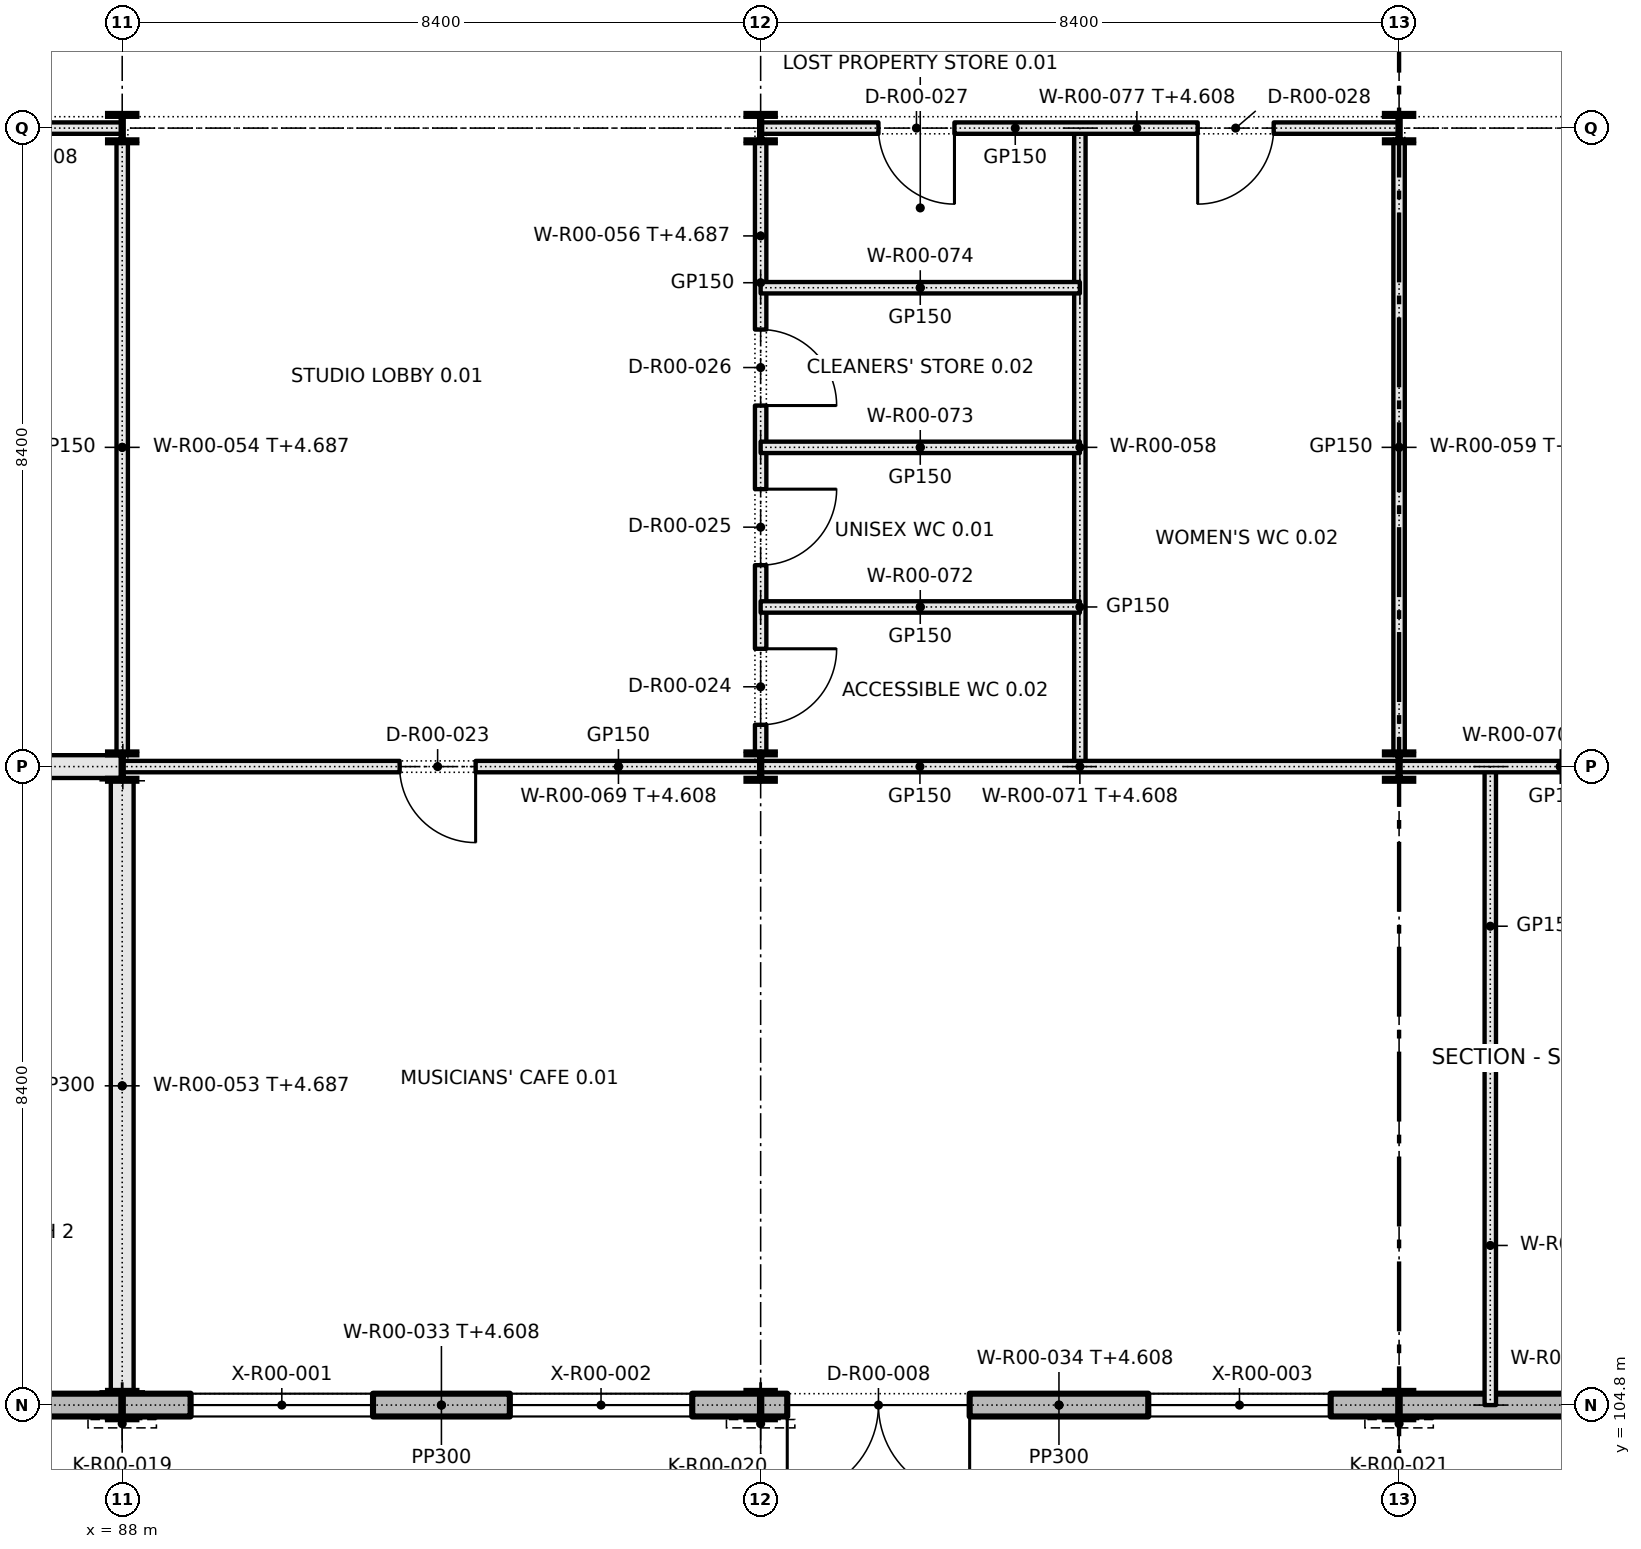
"""IFC4 building model, lengths in metres.
Left out: names, types, materials, properties, quantities, classifications, styles, units other than length and angle.
Written with IfcOpenShell. Run it as: python <this file> out.ifc"""

import sys

from ifc_helpers import new_model, si_unit, direction, frame, frame_2d, origin, origin_2d, place, context, subcontext, project, spatial, rectangle, i_section, extrude, element, fill, save


model = new_model("IFC4")
c1 = context("Model", 3, precision=1e-05, world=origin(), true_north=direction((0.0, 1.0)))
c2 = subcontext(c1, "Body", "Model", "MODEL_VIEW")
j1 = project(units=[si_unit("LENGTHUNIT", "METRE"), si_unit("PLANEANGLEUNIT", "RADIAN")], contexts=[c1])
p1 = place(None, origin())
s1 = spatial("IfcSite", under=j1, at=p1, CompositionType="ELEMENT")
p2 = place(p1, origin())
s2 = spatial("IfcBuilding", under=s1, at=p2, CompositionType="ELEMENT")
p3 = place(p2, origin())
s3 = spatial("IfcBuildingStorey", under=s2, at=p3, CompositionType="ELEMENT", Elevation=0.0)
for number, where, z_axis, x_axis in (
    (1, (88.0, 104.8, 0.0), (0.0, 0.0, 1.0), (1.0, 0.0, 0.0)),
    (2, (88.0, 113.2, 0.0), (0.0, 0.0, 1.0), (1.0, 0.0, 0.0)),
    (3, (88.0, 121.6, 0.0), (0.0, 0.0, 1.0), (1.0, 0.0, 0.0)),
    (4, (96.4, 104.8, 0.0), (0.0, 0.0, 1.0), (1.0, 0.0, 0.0)),
    (5, (96.4, 113.2, 0.0), (0.0, 0.0, 1.0), (1.0, 0.0, 0.0)),
    (6, (96.4, 121.6, 0.0), (0.0, 0.0, 1.0), (1.0, 0.0, 0.0)),
    (7, (104.8, 104.8, 0.0), (0.0, 0.0, 1.0), (1.0, 0.0, 0.0)),
    (8, (104.8, 113.2, 0.0), (0.0, 0.0, 1.0), (1.0, 0.0, 0.0)),
    (9, (104.8, 121.6, 0.0), (0.0, 0.0, 1.0), (1.0, 0.0, 0.0)),
):
    element("IfcColumn", number, at=place(p3, frame(where, z_axis=z_axis, x_axis=x_axis)), inside=s3, PredefinedType="COLUMN", context=c2, shape_type="SweptSolid", body=[
        extrude(i_section(OverallWidth=0.373, OverallDepth=0.373, WebThickness=0.016, FlangeThickness=0.026, FilletRadius=0.015, at=origin_2d()), origin(), (0.0, 0.0, 1.0), 5.4),
    ])
p4 = place(p3, frame((79.592, 104.8, 0.0), z_axis=(0.0, 0.0, 1.0), x_axis=(1.0, 0.0, 0.0)))
e10 = element("IfcWall", 10, at=p4, inside=s3, PredefinedType="SOLIDWALL", context=c2, shape_type="SweptSolid", body=[
    extrude(rectangle(XDim=8.417, YDim=0.3, at=frame_2d((4.208, 0.0))), origin(), (0.0, 0.0, 1.0), 4.608),
])
p5 = place(p3, frame((87.992, 104.8, 0.0), z_axis=(0.0, 0.0, 1.0), x_axis=(1.0, 0.0, 0.0)))
e11 = element("IfcWall", 11, at=p5, inside=s3, PredefinedType="SOLIDWALL", context=c2, shape_type="SweptSolid", body=[
    extrude(rectangle(XDim=8.417, YDim=0.3, at=frame_2d((4.208, 0.0))), origin(), (0.0, 0.0, 1.0), 4.608),
])
p6 = place(p5, frame((0.908, 0.0, 0.95)))
e12 = element("IfcOpeningElement", 12, at=p6, cuts=e11, PredefinedType="OPENING", context=c2, shape_type="SweptSolid", body=[
    extrude(rectangle(XDim=2.4, YDim=1.8, at=frame_2d((1.2, 0.9))), frame((0.0, 0.16, 0.0), z_axis=(0.0, -1.0, 0.0), x_axis=(1.0, 0.0, 0.0)), (0.0, 0.0, 1.0), 0.32),
])
p7 = place(p5, frame((5.108, 0.0, 0.95)))
e13 = element("IfcOpeningElement", 13, at=p7, cuts=e11, PredefinedType="OPENING", context=c2, shape_type="SweptSolid", body=[
    extrude(rectangle(XDim=2.4, YDim=1.8, at=frame_2d((1.2, 0.9))), frame((0.0, 0.16, 0.0), z_axis=(0.0, -1.0, 0.0), x_axis=(1.0, 0.0, 0.0)), (0.0, 0.0, 1.0), 0.32),
])
p8 = place(p3, frame((96.392, 104.8, 0.0), z_axis=(0.0, 0.0, 1.0), x_axis=(1.0, 0.0, 0.0)))
e14 = element("IfcWall", 14, at=p8, inside=s3, PredefinedType="SOLIDWALL", context=c2, shape_type="SweptSolid", body=[
    extrude(rectangle(XDim=8.416, YDim=0.3, at=frame_2d((4.208, 0.0))), origin(), (0.0, 0.0, 1.0), 4.608),
])
p9 = place(p8, frame((0.358, 0.0, 0.0)))
e15 = element("IfcOpeningElement", 15, at=p9, cuts=e14, PredefinedType="OPENING", context=c2, shape_type="SweptSolid", body=[
    extrude(rectangle(XDim=2.4, YDim=2.1, at=frame_2d((1.2, 1.05))), frame((0.0, 0.16, 0.0), z_axis=(0.0, -1.0, 0.0), x_axis=(1.0, 0.0, 0.0)), (0.0, 0.0, 1.0), 0.32),
])
p10 = place(p8, frame((5.108, 0.0, 0.95)))
e16 = element("IfcOpeningElement", 16, at=p10, cuts=e14, PredefinedType="OPENING", context=c2, shape_type="SweptSolid", body=[
    extrude(rectangle(XDim=2.4, YDim=1.8, at=frame_2d((1.2, 0.9))), frame((0.0, 0.16, 0.0), z_axis=(0.0, -1.0, 0.0), x_axis=(1.0, 0.0, 0.0)), (0.0, 0.0, 1.0), 0.32),
])
p11 = place(p3, frame((104.792, 104.8, 0.0), z_axis=(0.0, 0.0, 1.0), x_axis=(1.0, 0.0, 0.0)))
e17 = element("IfcWall", 17, at=p11, inside=s3, PredefinedType="SOLIDWALL", context=c2, shape_type="SweptSolid", body=[
    extrude(rectangle(XDim=8.417, YDim=0.3, at=frame_2d((4.208, 0.0))), origin(), (0.0, 0.0, 1.0), 4.608),
])
p12 = place(p11, frame((5.108, 0.0, 0.95)))
e18 = element("IfcOpeningElement", 18, at=p12, cuts=e17, PredefinedType="OPENING", context=c2, shape_type="SweptSolid", body=[
    extrude(rectangle(XDim=2.4, YDim=1.8, at=frame_2d((1.2, 0.9))), frame((0.0, 0.16, 0.0), z_axis=(0.0, -1.0, 0.0), x_axis=(1.0, 0.0, 0.0)), (0.0, 0.0, 1.0), 0.32),
])
p13 = place(p3, frame((88.0, 104.987, 0.0), z_axis=(0.0, 0.0, 1.0), x_axis=(0.0, 1.0, 0.0)))
e19 = element("IfcWall", 19, at=p13, inside=s3, PredefinedType="PARTITIONING", context=c2, shape_type="SweptSolid", body=[
    extrude(rectangle(XDim=8.027, YDim=0.3, at=frame_2d((4.013, 0.0))), origin(), (0.0, 0.0, 1.0), 4.687),
])
p14 = place(p3, frame((88.0, 113.387, 0.0), z_axis=(0.0, 0.0, 1.0), x_axis=(0.0, 1.0, 0.0)))
e20 = element("IfcWall", 20, at=p14, inside=s3, PredefinedType="PARTITIONING", context=c2, shape_type="SweptSolid", body=[
    extrude(rectangle(XDim=8.027, YDim=0.15, at=frame_2d((4.013, 0.0))), origin(), (0.0, 0.0, 1.0), 4.687),
])
p15 = place(p3, frame((96.4, 113.387, 0.0), z_axis=(0.0, 0.0, 1.0), x_axis=(0.0, 1.0, 0.0)))
e21 = element("IfcWall", 21, at=p15, inside=s3, PredefinedType="PARTITIONING", context=c2, shape_type="SweptSolid", body=[
    extrude(rectangle(XDim=8.027, YDim=0.15, at=frame_2d((4.013, 0.0))), origin(), (0.0, 0.0, 1.0), 4.687),
])
p16 = place(p15, frame((0.363, 0.0, 0.0)))
e22 = element("IfcOpeningElement", 22, at=p16, cuts=e21, PredefinedType="OPENING", context=c2, shape_type="SweptSolid", body=[
    extrude(rectangle(XDim=1.0, YDim=2.1, at=frame_2d((0.5, 1.05))), frame((0.0, 0.085, 0.0), z_axis=(0.0, -1.0, 0.0), x_axis=(1.0, 0.0, 0.0)), (0.0, 0.0, 1.0), 0.17),
])
p17 = place(p15, frame((2.463, 0.0, 0.0)))
e23 = element("IfcOpeningElement", 23, at=p17, cuts=e21, PredefinedType="OPENING", context=c2, shape_type="SweptSolid", body=[
    extrude(rectangle(XDim=1.0, YDim=2.1, at=frame_2d((0.5, 1.05))), frame((0.0, 0.085, 0.0), z_axis=(0.0, -1.0, 0.0), x_axis=(1.0, 0.0, 0.0)), (0.0, 0.0, 1.0), 0.17),
])
p18 = place(p15, frame((4.563, 0.0, 0.0)))
e24 = element("IfcOpeningElement", 24, at=p18, cuts=e21, PredefinedType="OPENING", context=c2, shape_type="SweptSolid", body=[
    extrude(rectangle(XDim=1.0, YDim=2.1, at=frame_2d((0.5, 1.05))), frame((0.0, 0.085, 0.0), z_axis=(0.0, -1.0, 0.0), x_axis=(1.0, 0.0, 0.0)), (0.0, 0.0, 1.0), 0.17),
])
p19 = place(p3, frame((100.6, 113.2, 0.0), z_axis=(0.0, 0.0, 1.0), x_axis=(0.0, 1.0, 0.0)))
e25 = element("IfcWall", 25, at=p19, inside=s3, PredefinedType="PARTITIONING", context=c2, shape_type="SweptSolid", body=[
    extrude(rectangle(XDim=8.4, YDim=0.15, at=frame_2d((4.2, 0.0))), origin(), (0.0, 0.0, 1.0), 5.4),
])
p20 = place(p3, frame((104.8, 113.387, 0.0), z_axis=(0.0, 0.0, 1.0), x_axis=(0.0, 1.0, 0.0)))
e26 = element("IfcWall", 26, at=p20, inside=s3, PredefinedType="PARTITIONING", context=c2, shape_type="SweptSolid", body=[
    extrude(rectangle(XDim=8.027, YDim=0.15, at=frame_2d((4.013, 0.0))), origin(), (0.0, 0.0, 1.0), 4.687),
])
p21 = place(p3, frame((106.0, 104.8, 0.0), z_axis=(0.0, 0.0, 1.0), x_axis=(0.0, 1.0, 0.0)))
e27 = element("IfcWall", 27, at=p21, inside=s3, PredefinedType="PARTITIONING", context=c2, shape_type="SweptSolid", body=[
    extrude(rectangle(XDim=8.4, YDim=0.15, at=frame_2d((4.2, 0.0))), origin(), (0.0, 0.0, 1.0), 5.4),
])
p22 = place(p3, frame((79.592, 113.2, 0.0), z_axis=(0.0, 0.0, 1.0), x_axis=(1.0, 0.0, 0.0)))
e28 = element("IfcWall", 28, at=p22, inside=s3, PredefinedType="PARTITIONING", context=c2, shape_type="SweptSolid", body=[
    extrude(rectangle(XDim=8.417, YDim=0.3, at=frame_2d((4.208, 0.0))), origin(), (0.0, 0.0, 1.0), 4.608),
])
p23 = place(p3, frame((87.992, 113.2, 0.0), z_axis=(0.0, 0.0, 1.0), x_axis=(1.0, 0.0, 0.0)))
e29 = element("IfcWall", 29, at=p23, inside=s3, PredefinedType="PARTITIONING", context=c2, shape_type="SweptSolid", body=[
    extrude(rectangle(XDim=8.417, YDim=0.15, at=frame_2d((4.208, 0.0))), origin(), (0.0, 0.0, 1.0), 4.608),
])
p24 = place(p23, frame((3.658, 0.0, 0.0)))
e30 = element("IfcOpeningElement", 30, at=p24, cuts=e29, PredefinedType="OPENING", context=c2, shape_type="SweptSolid", body=[
    extrude(rectangle(XDim=1.0, YDim=2.1, at=frame_2d((0.5, 1.05))), frame((0.0, 0.085, 0.0), z_axis=(0.0, -1.0, 0.0), x_axis=(1.0, 0.0, 0.0)), (0.0, 0.0, 1.0), 0.17),
])
p25 = place(p3, frame((104.792, 113.2, 0.0), z_axis=(0.0, 0.0, 1.0), x_axis=(1.0, 0.0, 0.0)))
e31 = element("IfcWall", 31, at=p25, inside=s3, PredefinedType="PARTITIONING", context=c2, shape_type="SweptSolid", body=[
    extrude(rectangle(XDim=8.4, YDim=0.15, at=frame_2d((4.2, 0.0))), origin(), (0.0, 0.0, 1.0), 4.608),
])
p26 = place(p25, frame((4.258, 0.0, 0.0)))
e32 = element("IfcOpeningElement", 32, at=p26, cuts=e31, PredefinedType="OPENING", context=c2, shape_type="SweptSolid", body=[
    extrude(rectangle(XDim=1.0, YDim=2.1, at=frame_2d((0.5, 1.05))), frame((0.0, 0.085, 0.0), z_axis=(0.0, -1.0, 0.0), x_axis=(1.0, 0.0, 0.0)), (0.0, 0.0, 1.0), 0.17),
])
p27 = place(p3, frame((96.392, 113.2, 0.0), z_axis=(0.0, 0.0, 1.0), x_axis=(1.0, 0.0, 0.0)))
e33 = element("IfcWall", 33, at=p27, inside=s3, PredefinedType="PARTITIONING", context=c2, shape_type="SweptSolid", body=[
    extrude(rectangle(XDim=8.416, YDim=0.15, at=frame_2d((4.208, 0.0))), origin(), (0.0, 0.0, 1.0), 4.608),
])
for number, where, z_axis, x_axis in (
    (34, (96.4, 115.3, 0.0), (0.0, 0.0, 1.0), (1.0, 0.0, 0.0)),
    (35, (96.4, 117.4, 0.0), (0.0, 0.0, 1.0), (1.0, 0.0, 0.0)),
    (36, (96.4, 119.5, 0.0), (0.0, 0.0, 1.0), (1.0, 0.0, 0.0)),
):
    element("IfcWall", number, at=place(p3, frame(where, z_axis=z_axis, x_axis=x_axis)), inside=s3, PredefinedType="PARTITIONING", context=c2, shape_type="SweptSolid", body=[
        extrude(rectangle(XDim=4.2, YDim=0.15, at=frame_2d((2.1, 0.0))), origin(), (0.0, 0.0, 1.0), 5.4),
    ])
p28 = place(p3, frame((96.408, 121.6, 0.0), z_axis=(0.0, 0.0, 1.0), x_axis=(1.0, 0.0, 0.0)))
e37 = element("IfcWall", 37, at=p28, inside=s3, PredefinedType="PARTITIONING", context=c2, shape_type="SweptSolid", body=[
    extrude(rectangle(XDim=8.384, YDim=0.15, at=frame_2d((4.192, 0.0))), origin(), (0.0, 0.0, 1.0), 4.608),
])
p29 = place(p28, frame((1.542, 0.0, 0.0)))
e38 = element("IfcOpeningElement", 38, at=p29, cuts=e37, PredefinedType="OPENING", context=c2, shape_type="SweptSolid", body=[
    extrude(rectangle(XDim=1.0, YDim=2.1, at=frame_2d((0.5, 1.05))), frame((0.0, 0.085, 0.0), z_axis=(0.0, -1.0, 0.0), x_axis=(1.0, 0.0, 0.0)), (0.0, 0.0, 1.0), 0.17),
])
p30 = place(p28, frame((5.742, 0.0, 0.0)))
e39 = element("IfcOpeningElement", 39, at=p30, cuts=e37, PredefinedType="OPENING", context=c2, shape_type="SweptSolid", body=[
    extrude(rectangle(XDim=1.0, YDim=2.1, at=frame_2d((0.5, 1.05))), frame((0.0, 0.085, 0.0), z_axis=(0.0, -1.0, 0.0), x_axis=(1.0, 0.0, 0.0)), (0.0, 0.0, 1.0), 0.17),
])
p31 = place(p3, frame((79.592, 121.6, 0.0), z_axis=(0.0, 0.0, 1.0), x_axis=(1.0, 0.0, 0.0)))
e40 = element("IfcWall", 40, at=p31, inside=s3, PredefinedType="PARTITIONING", context=c2, shape_type="SweptSolid", body=[
    extrude(rectangle(XDim=8.4, YDim=0.15, at=frame_2d((4.2, 0.0))), origin(), (0.0, 0.0, 1.0), 4.608),
])
p32 = place(p31, frame((3.658, 0.0, 0.0)))
e41 = element("IfcOpeningElement", 41, at=p32, cuts=e40, PredefinedType="OPENING", context=c2, shape_type="SweptSolid", body=[
    extrude(rectangle(XDim=1.0, YDim=2.1, at=frame_2d((0.5, 1.05))), frame((0.0, 0.085, 0.0), z_axis=(0.0, -1.0, 0.0), x_axis=(1.0, 0.0, 0.0)), (0.0, 0.0, 1.0), 0.17),
])
p33 = place(p9, frame((2.4, 0.0, 0.0), z_axis=(0.0, 0.0, 1.0), x_axis=(-1.0, 0.0, 0.0)))
e42 = element("IfcDoor", 42, at=p33, inside=s3, OperationType="DOUBLE_DOOR_SINGLE_SWING", PredefinedType="DOOR", context=c2, shape_type="SweptSolid", body=[
    extrude(rectangle(XDim=2.4, YDim=2.1, at=frame_2d((1.2, 1.05))), frame((0.0, 0.025, 0.0), z_axis=(0.0, -1.0, 0.0), x_axis=(1.0, 0.0, 0.0)), (0.0, 0.0, 1.0), 0.05),
])
fill(e15, e42)
p34 = place(p6, origin())
e43 = element("IfcWindow", 43, at=p34, inside=s3, PartitioningType="DOUBLE_PANEL_VERTICAL", PredefinedType="WINDOW", context=c2, shape_type="SweptSolid", body=[
    extrude(rectangle(XDim=2.4, YDim=1.8, at=frame_2d((1.2, 0.9))), frame((0.0, 0.03, 0.0), z_axis=(0.0, -1.0, 0.0), x_axis=(1.0, 0.0, 0.0)), (0.0, 0.0, 1.0), 0.06),
])
fill(e12, e43)
p35 = place(p7, origin())
e44 = element("IfcWindow", 44, at=p35, inside=s3, PartitioningType="DOUBLE_PANEL_VERTICAL", PredefinedType="WINDOW", context=c2, shape_type="SweptSolid", body=[
    extrude(rectangle(XDim=2.4, YDim=1.8, at=frame_2d((1.2, 0.9))), frame((0.0, 0.03, 0.0), z_axis=(0.0, -1.0, 0.0), x_axis=(1.0, 0.0, 0.0)), (0.0, 0.0, 1.0), 0.06),
])
fill(e13, e44)
p36 = place(p10, origin())
e45 = element("IfcWindow", 45, at=p36, inside=s3, PartitioningType="DOUBLE_PANEL_VERTICAL", PredefinedType="WINDOW", context=c2, shape_type="SweptSolid", body=[
    extrude(rectangle(XDim=2.4, YDim=1.8, at=frame_2d((1.2, 0.9))), frame((0.0, 0.03, 0.0), z_axis=(0.0, -1.0, 0.0), x_axis=(1.0, 0.0, 0.0)), (0.0, 0.0, 1.0), 0.06),
])
fill(e16, e45)
p37 = place(p24, frame((1.0, 0.0, 0.0), z_axis=(0.0, 0.0, 1.0), x_axis=(-1.0, 0.0, 0.0)))
e46 = element("IfcDoor", 46, at=p37, inside=s3, OperationType="SINGLE_SWING_LEFT", PredefinedType="DOOR", context=c2, shape_type="SweptSolid", body=[
    extrude(rectangle(XDim=1.0, YDim=2.1, at=frame_2d((0.5, 1.05))), frame((0.0, 0.025, 0.0), z_axis=(0.0, -1.0, 0.0), x_axis=(1.0, 0.0, 0.0)), (0.0, 0.0, 1.0), 0.05),
])
fill(e30, e46)
p38 = place(p16, frame((1.0, 0.0, 0.0), z_axis=(0.0, 0.0, 1.0), x_axis=(-1.0, 0.0, 0.0)))
e47 = element("IfcDoor", 47, at=p38, inside=s3, OperationType="SINGLE_SWING_LEFT", PredefinedType="DOOR", context=c2, shape_type="SweptSolid", body=[
    extrude(rectangle(XDim=1.0, YDim=2.1, at=frame_2d((0.5, 1.05))), frame((0.0, 0.025, 0.0), z_axis=(0.0, -1.0, 0.0), x_axis=(1.0, 0.0, 0.0)), (0.0, 0.0, 1.0), 0.05),
])
fill(e22, e47)
p39 = place(p17, frame((1.0, 0.0, 0.0), z_axis=(0.0, 0.0, 1.0), x_axis=(-1.0, 0.0, 0.0)))
e48 = element("IfcDoor", 48, at=p39, inside=s3, OperationType="SINGLE_SWING_LEFT", PredefinedType="DOOR", context=c2, shape_type="SweptSolid", body=[
    extrude(rectangle(XDim=1.0, YDim=2.1, at=frame_2d((0.5, 1.05))), frame((0.0, 0.025, 0.0), z_axis=(0.0, -1.0, 0.0), x_axis=(1.0, 0.0, 0.0)), (0.0, 0.0, 1.0), 0.05),
])
fill(e23, e48)
p40 = place(p18, frame((1.0, 0.0, 0.0), z_axis=(0.0, 0.0, 1.0), x_axis=(-1.0, 0.0, 0.0)))
e49 = element("IfcDoor", 49, at=p40, inside=s3, OperationType="SINGLE_SWING_RIGHT", PredefinedType="DOOR", context=c2, shape_type="SweptSolid", body=[
    extrude(rectangle(XDim=1.0, YDim=2.1, at=frame_2d((0.5, 1.05))), frame((0.0, 0.025, 0.0), z_axis=(0.0, -1.0, 0.0), x_axis=(1.0, 0.0, 0.0)), (0.0, 0.0, 1.0), 0.05),
])
fill(e24, e49)
p41 = place(p29, frame((1.0, 0.0, 0.0), z_axis=(0.0, 0.0, 1.0), x_axis=(-1.0, 0.0, 0.0)))
e50 = element("IfcDoor", 50, at=p41, inside=s3, OperationType="SINGLE_SWING_LEFT", PredefinedType="DOOR", context=c2, shape_type="SweptSolid", body=[
    extrude(rectangle(XDim=1.0, YDim=2.1, at=frame_2d((0.5, 1.05))), frame((0.0, 0.025, 0.0), z_axis=(0.0, -1.0, 0.0), x_axis=(1.0, 0.0, 0.0)), (0.0, 0.0, 1.0), 0.05),
])
fill(e38, e50)
p42 = place(p30, frame((1.0, 0.0, 0.0), z_axis=(0.0, 0.0, 1.0), x_axis=(-1.0, 0.0, 0.0)))
e51 = element("IfcDoor", 51, at=p42, inside=s3, OperationType="SINGLE_SWING_RIGHT", PredefinedType="DOOR", context=c2, shape_type="SweptSolid", body=[
    extrude(rectangle(XDim=1.0, YDim=2.1, at=frame_2d((0.5, 1.05))), frame((0.0, 0.025, 0.0), z_axis=(0.0, -1.0, 0.0), x_axis=(1.0, 0.0, 0.0)), (0.0, 0.0, 1.0), 0.05),
])
fill(e39, e51)
save(model, sys.argv[1])
